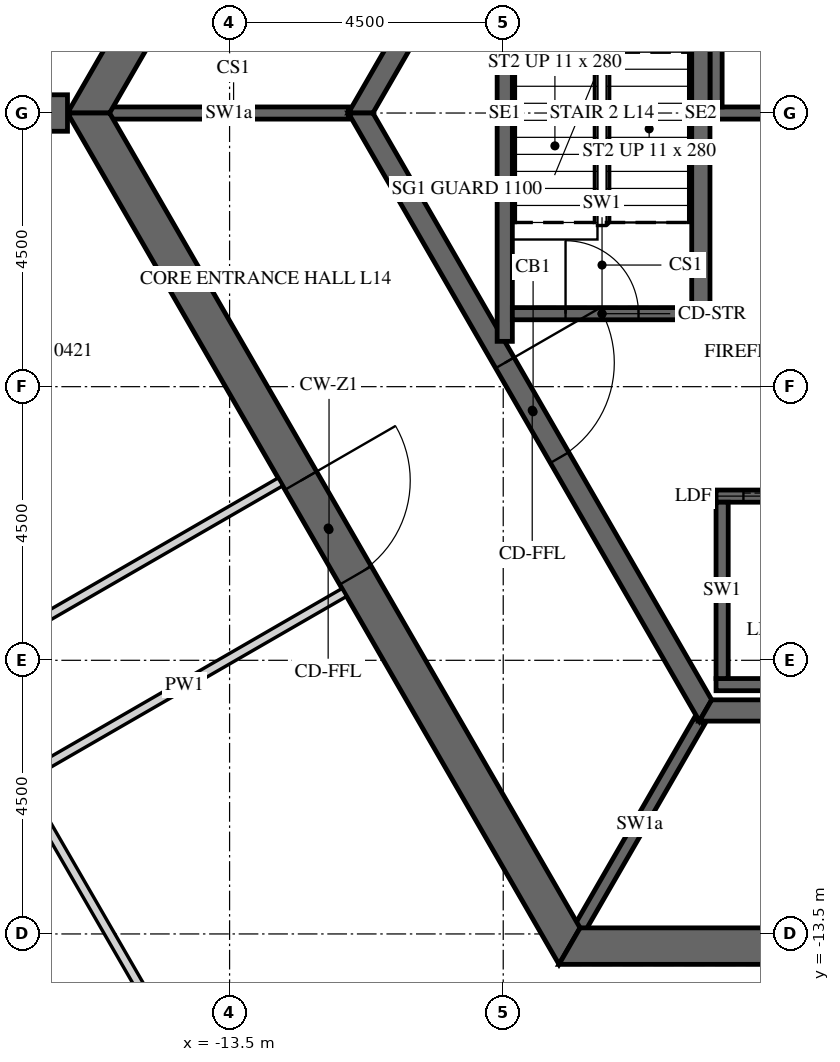
"""IFC4 building model, lengths in metres.
Left out: names, types, materials, properties, quantities, classifications, styles, units other than length and angle.
Written with IfcOpenShell. Run it as: python <this file> out.ifc"""

import sys

from ifc_helpers import new_model, si_unit, direction, frame, frame_2d, origin, place, context, subcontext, project, spatial, polyline, rectangle, outline, extrude, element, fill, save


model = new_model("IFC4")
c1 = context("Model", 3, precision=1e-05, world=origin(), true_north=direction((0.0, 1.0)))
c2 = subcontext(c1, "Body", "Model", "MODEL_VIEW")
j1 = project(units=[si_unit("LENGTHUNIT", "METRE"), si_unit("PLANEANGLEUNIT", "RADIAN")], contexts=[c1])
p1 = place(None, origin())
s1 = spatial("IfcSite", under=j1, at=p1, CompositionType="ELEMENT")
p2 = place(p1, origin())
s2 = spatial("IfcBuilding", under=s1, at=p2, CompositionType="ELEMENT")
p3 = place(p2, frame((0.0, 0.0, 68.7)))
s3 = spatial("IfcBuildingStorey", under=s2, at=p3, CompositionType="ELEMENT", Elevation=68.7)
p4 = place(p3, frame((-7.91, 13.7, -0.15), z_axis=(0.0, 0.0, 1.0), x_axis=(-0.499999880136, -0.866025472988, 0.0)))
e1 = element("IfcWall", 1, at=p4, inside=s3, PredefinedType="SHEAR", context=c2, shape_type="SweptSolid", body=[
    extrude(outline(polyline([(-0.173, -0.3), (15.993, -0.3), (15.646, 0.3), (0.173, 0.3), (-0.173, -0.3)])), origin(), (0.0, 0.0, 1.0), 3.9),
])
p5 = place(p4, frame((7.039, 0.0, 0.15)))
e2 = element("IfcOpeningElement", 2, at=p5, cuts=e1, PredefinedType="OPENING", context=c2, shape_type="SweptSolid", body=[
    extrude(rectangle(XDim=1.8, YDim=2.4, at=frame_2d((0.9, 1.2))), frame((0.0, 0.31, 0.0), z_axis=(0.0, -1.0, 0.0), x_axis=(1.0, 0.0, 0.0)), (0.0, 0.0, 1.0), 0.62),
])
p6 = place(p3, frame((-15.819, 0.0, -0.15), z_axis=(0.0, 0.0, 1.0), x_axis=(0.499999880136, -0.866025472988, 0.0)))
e3 = element("IfcWall", 3, at=p6, inside=s3, PredefinedType="SHEAR", context=c2, shape_type="SweptSolid", body=[
    extrude(outline(polyline([(-0.173, -0.3), (15.993, -0.3), (15.646, 0.3), (0.173, 0.3), (-0.173, -0.3)])), origin(), (0.0, 0.0, 1.0), 3.9),
])
p7 = place(p6, frame((6.981, 0.0, 0.15)))
e4 = element("IfcOpeningElement", 4, at=p7, cuts=e3, PredefinedType="OPENING", context=c2, shape_type="SweptSolid", body=[
    extrude(rectangle(XDim=1.8, YDim=2.4, at=frame_2d((0.9, 1.2))), frame((0.0, 0.31, 0.0), z_axis=(0.0, -1.0, 0.0), x_axis=(1.0, 0.0, 0.0)), (0.0, 0.0, 1.0), 0.62),
])
p8 = place(p3, frame((-7.91, -13.7, -0.15), z_axis=(0.0, 0.0, 1.0), x_axis=(1.0, 0.0, 0.0)))
e5 = element("IfcWall", 5, at=p8, inside=s3, PredefinedType="SHEAR", context=c2, shape_type="SweptSolid", body=[
    extrude(outline(polyline([(-0.173, -0.3), (15.993, -0.3), (15.646, 0.3), (0.173, 0.3), (-0.173, -0.3)])), origin(), (0.0, 0.0, 1.0), 3.9),
])
p9 = place(p8, frame((7.31, 0.0, 0.15)))
e6 = element("IfcOpeningElement", 6, at=p9, cuts=e5, PredefinedType="OPENING", context=c2, shape_type="SweptSolid", body=[
    extrude(rectangle(XDim=1.2, YDim=2.4, at=frame_2d((0.6, 1.2))), frame((0.0, 0.31, 0.0), z_axis=(0.0, -1.0, 0.0), x_axis=(1.0, 0.0, 0.0)), (0.0, 0.0, 1.0), 0.62),
])
p10 = place(p3, frame((-16.166, 0.0, -0.15), z_axis=(0.0, 0.0, 1.0), x_axis=(-1.0, 0.0, 0.0)))
e7 = element("IfcWall", 7, at=p10, inside=s3, PredefinedType="SHEAR", context=c2, shape_type="SweptSolid", body=[
    extrude(rectangle(XDim=16.509, YDim=0.6, at=frame_2d((8.254, 0.0))), origin(), (0.0, 0.0, 1.0), 3.9),
])
p11 = place(p10, frame((7.354, 0.0, 0.15)))
e8 = element("IfcOpeningElement", 8, at=p11, cuts=e7, PredefinedType="OPENING", context=c2, shape_type="SweptSolid", body=[
    extrude(rectangle(XDim=1.8, YDim=2.4, at=frame_2d((0.9, 1.2))), frame((0.0, 0.31, 0.0), z_axis=(0.0, -1.0, 0.0), x_axis=(1.0, 0.0, 0.0)), (0.0, 0.0, 1.0), 0.62),
])
p12 = place(p3, frame((-5.673, 9.825, -0.15), z_axis=(0.0, 0.0, 1.0), x_axis=(-0.499995046907, -0.866028263435, 0.0)))
e9 = element("IfcWall", 9, at=p12, inside=s3, PredefinedType="SHEAR", context=c2, shape_type="SweptSolid", body=[
    extrude(outline(polyline([(-0.101, -0.175), (11.446, -0.175), (11.244, 0.175), (0.101, 0.175), (-0.101, -0.175)])), origin(), (0.0, 0.0, 1.0), 3.9),
])
p13 = place(p12, frame((4.801, 0.0, 0.15)))
e10 = element("IfcOpeningElement", 10, at=p13, cuts=e9, PredefinedType="OPENING", context=c2, shape_type="SweptSolid", body=[
    extrude(rectangle(XDim=1.8, YDim=2.4, at=frame_2d((0.9, 1.2))), frame((0.0, 0.185, 0.0), z_axis=(0.0, -1.0, 0.0), x_axis=(1.0, 0.0, 0.0)), (0.0, 0.0, 1.0), 0.37),
])
p14 = place(p3, frame((-11.345, 0.0, -0.15), z_axis=(0.0, 0.0, 1.0), x_axis=(0.499995046907, -0.866028263435, 0.0)))
e11 = element("IfcWall", 11, at=p14, inside=s3, PredefinedType="SHEAR", context=c2, shape_type="SweptSolid", body=[
    extrude(outline(polyline([(-0.101, -0.175), (11.446, -0.175), (11.244, 0.175), (0.101, 0.175), (-0.101, -0.175)])), origin(), (0.0, 0.0, 1.0), 3.9),
])
p15 = place(p14, frame((4.744, 0.0, 0.15)))
e12 = element("IfcOpeningElement", 12, at=p15, cuts=e11, PredefinedType="OPENING", context=c2, shape_type="SweptSolid", body=[
    extrude(rectangle(XDim=1.8, YDim=2.4, at=frame_2d((0.9, 1.2))), frame((0.0, 0.185, 0.0), z_axis=(0.0, -1.0, 0.0), x_axis=(1.0, 0.0, 0.0)), (0.0, 0.0, 1.0), 0.37),
])
p16 = place(p3, frame((-5.673, -9.825, -0.15), z_axis=(0.0, 0.0, 1.0), x_axis=(1.0, 0.0, 0.0)))
e13 = element("IfcWall", 13, at=p16, inside=s3, PredefinedType="SHEAR", context=c2, shape_type="SweptSolid", body=[
    extrude(outline(polyline([(-0.101, -0.175), (11.446, -0.175), (11.244, 0.175), (0.101, 0.175), (-0.101, -0.175)])), origin(), (0.0, 0.0, 1.0), 3.9),
])
p17 = place(p3, frame((-5.6, 0.0, -0.25), z_axis=(0.0, 0.0, 1.0), x_axis=(1.0, 0.0, 0.0)))
e14 = element("IfcWall", 14, at=p17, inside=s3, PredefinedType="SHEAR", context=c2, shape_type="SweptSolid", body=[
    extrude(rectangle(XDim=11.2, YDim=0.2, at=frame_2d((5.6, 0.0))), origin(), (0.0, 0.0, 1.0), 3.9),
])
p18 = place(p3, frame((-5.5, 0.1, -0.25), z_axis=(0.0, 0.0, 1.0), x_axis=(0.0, 1.0, 0.0)))
e15 = element("IfcWall", 15, at=p18, inside=s3, PredefinedType="SHEAR", context=c2, shape_type="SweptSolid", body=[
    extrude(rectangle(XDim=3.1, YDim=0.2, at=frame_2d((1.55, 0.0))), origin(), (0.0, 0.0, 1.0), 3.9),
])
p19 = place(p3, frame((-5.5, -6.3, -0.25), z_axis=(0.0, 0.0, 1.0), x_axis=(1.0, 0.0, 0.0)))
e16 = element("IfcWall", 16, at=p19, inside=s3, PredefinedType="SHEAR", context=c2, shape_type="SweptSolid", body=[
    extrude(rectangle(XDim=9.2, YDim=0.2, at=frame_2d((4.6, 0.0))), origin(), (0.0, 0.0, 1.0), 3.9),
])
p20 = place(p19, frame((0.45, 0.0, 0.25)))
e17 = element("IfcOpeningElement", 17, at=p20, cuts=e16, PredefinedType="OPENING", context=c2, shape_type="SweptSolid", body=[
    extrude(rectangle(XDim=1.1, YDim=2.1, at=frame_2d((0.55, 1.05))), frame((0.0, 0.11, 0.0), z_axis=(0.0, -1.0, 0.0), x_axis=(1.0, 0.0, 0.0)), (0.0, 0.0, 1.0), 0.22),
])
p21 = place(p19, frame((2.25, 0.0, 0.25)))
e18 = element("IfcOpeningElement", 18, at=p21, cuts=e16, PredefinedType="OPENING", context=c2, shape_type="SweptSolid", body=[
    extrude(rectangle(XDim=1.1, YDim=2.1, at=frame_2d((0.55, 1.05))), frame((0.0, 0.11, 0.0), z_axis=(0.0, -1.0, 0.0), x_axis=(1.0, 0.0, 0.0)), (0.0, 0.0, 1.0), 0.22),
])
p22 = place(p19, frame((4.05, 0.0, 0.25)))
e19 = element("IfcOpeningElement", 19, at=p22, cuts=e16, PredefinedType="OPENING", context=c2, shape_type="SweptSolid", body=[
    extrude(rectangle(XDim=1.1, YDim=2.1, at=frame_2d((0.55, 1.05))), frame((0.0, 0.11, 0.0), z_axis=(0.0, -1.0, 0.0), x_axis=(1.0, 0.0, 0.0)), (0.0, 0.0, 1.0), 0.22),
])
p23 = place(p19, frame((5.85, 0.0, 0.25)))
e20 = element("IfcOpeningElement", 20, at=p23, cuts=e16, PredefinedType="OPENING", context=c2, shape_type="SweptSolid", body=[
    extrude(rectangle(XDim=1.1, YDim=2.1, at=frame_2d((0.55, 1.05))), frame((0.0, 0.11, 0.0), z_axis=(0.0, -1.0, 0.0), x_axis=(1.0, 0.0, 0.0)), (0.0, 0.0, 1.0), 0.22),
])
p24 = place(p19, frame((7.65, 0.0, 0.25)))
e21 = element("IfcOpeningElement", 21, at=p24, cuts=e16, PredefinedType="OPENING", context=c2, shape_type="SweptSolid", body=[
    extrude(rectangle(XDim=1.1, YDim=2.1, at=frame_2d((0.55, 1.05))), frame((0.0, 0.11, 0.0), z_axis=(0.0, -1.0, 0.0), x_axis=(1.0, 0.0, 0.0)), (0.0, 0.0, 1.0), 0.22),
])
p25 = place(p3, frame((-5.5, -9.4, -0.25), z_axis=(0.0, 0.0, 1.0), x_axis=(1.0, 0.0, 0.0)))
e22 = element("IfcWall", 22, at=p25, inside=s3, PredefinedType="SHEAR", context=c2, shape_type="SweptSolid", body=[
    extrude(rectangle(XDim=9.2, YDim=0.2, at=frame_2d((4.6, 0.0))), origin(), (0.0, 0.0, 1.0), 3.9),
])
p26 = place(p3, frame((-5.4, -9.3, -0.25), z_axis=(0.0, 0.0, 1.0), x_axis=(0.0, 1.0, 0.0)))
e23 = element("IfcWall", 23, at=p26, inside=s3, PredefinedType="SHEAR", context=c2, shape_type="SweptSolid", body=[
    extrude(rectangle(XDim=2.9, YDim=0.2, at=frame_2d((1.45, 0.0))), origin(), (0.0, 0.0, 1.0), 3.9),
])
p27 = place(p3, frame((-11.547, 0.0, -0.15), z_axis=(0.0, 0.0, 1.0), x_axis=(-1.0, 0.0, 0.0)))
e24 = element("IfcWall", 24, at=p27, inside=s3, PredefinedType="SHEAR", context=c2, shape_type="SweptSolid", body=[
    extrude(rectangle(XDim=3.926, YDim=0.2, at=frame_2d((1.963, 0.0))), origin(), (0.0, 0.0, 1.0), 3.9),
])
p28 = place(p3, frame((-5.773, -10.0, -0.15), z_axis=(0.0, 0.0, 1.0), x_axis=(-0.500038251005, -0.86600331843, 0.0)))
e25 = element("IfcWall", 25, at=p28, inside=s3, PredefinedType="SHEAR", context=c2, shape_type="SweptSolid", body=[
    extrude(rectangle(XDim=3.926, YDim=0.2, at=frame_2d((1.963, 0.0))), origin(), (0.0, 0.0, 1.0), 3.9),
])
p29 = place(p3, frame((-5.75, -3.4, -0.25), z_axis=(0.0, 0.0, 1.0), x_axis=(0.0, 1.0, 0.0)))
e26 = element("IfcWall", 26, at=p29, inside=s3, PredefinedType="SHEAR", context=c2, shape_type="SweptSolid", body=[
    extrude(rectangle(XDim=6.8, YDim=0.3, at=frame_2d((3.4, 0.0))), origin(), (0.0, 0.0, 1.0), 3.9),
])
p30 = place(p3, frame((-8.975, -3.755, -0.25), z_axis=(0.0, 0.0, 1.0), x_axis=(0.0, 1.0, 0.0)))
e27 = element("IfcWall", 27, at=p30, inside=s3, PredefinedType="SHEAR", context=c2, shape_type="SweptSolid", body=[
    extrude(rectangle(XDim=7.51, YDim=0.25, at=frame_2d((3.755, 0.0))), origin(), (0.0, 0.0, 1.0), 3.9),
])
p31 = place(p3, frame((-8.85, -3.3, -0.25), z_axis=(0.0, 0.0, 1.0), x_axis=(1.0, 0.0, 0.0)))
e28 = element("IfcWall", 28, at=p31, inside=s3, PredefinedType="SHEAR", context=c2, shape_type="SweptSolid", body=[
    extrude(rectangle(XDim=2.95, YDim=0.2, at=frame_2d((1.475, 0.0))), origin(), (0.0, 0.0, 1.0), 3.9),
])
p32 = place(p31, frame((0.875, 0.0, 0.25)))
e29 = element("IfcOpeningElement", 29, at=p32, cuts=e28, PredefinedType="OPENING", context=c2, shape_type="SweptSolid", body=[
    extrude(rectangle(XDim=1.2, YDim=2.4, at=frame_2d((0.6, 1.2))), frame((0.0, 0.11, 0.0), z_axis=(0.0, -1.0, 0.0), x_axis=(1.0, 0.0, 0.0)), (0.0, 0.0, 1.0), 0.22),
])
p33 = place(p3, frame((-24.09, -2.175, 0.0), z_axis=(0.0, 0.0, 1.0), x_axis=(0.499996832073, -0.86602723278, 0.0)))
e30 = element("IfcWall", 30, at=p33, inside=s3, PredefinedType="PARTITIONING", context=c2, shape_type="SweptSolid", body=[
    extrude(rectangle(XDim=23.877, YDim=0.15, at=frame_2d((11.938, 0.0))), origin(), (0.0, 0.0, 1.0), 2.988),
])
p34 = place(p33, frame((3.943, 0.0, 0.0)))
e31 = element("IfcOpeningElement", 31, at=p34, cuts=e30, PredefinedType="OPENING", context=c2, shape_type="SweptSolid", body=[
    extrude(rectangle(XDim=1.0, YDim=2.1, at=frame_2d((0.5, 1.05))), frame((0.0, 0.085, 0.0), z_axis=(0.0, -1.0, 0.0), x_axis=(1.0, 0.0, 0.0)), (0.0, 0.0, 1.0), 0.17),
])
p35 = place(p33, frame((15.672, 0.0, 0.0)))
e32 = element("IfcOpeningElement", 32, at=p35, cuts=e30, PredefinedType="OPENING", context=c2, shape_type="SweptSolid", body=[
    extrude(rectangle(XDim=1.0, YDim=2.1, at=frame_2d((0.5, 1.05))), frame((0.0, 0.085, 0.0), z_axis=(0.0, -1.0, 0.0), x_axis=(1.0, 0.0, 0.0)), (0.0, 0.0, 1.0), 0.17),
])
p36 = place(p33, frame((19.525, 0.0, 0.0)))
e33 = element("IfcOpeningElement", 33, at=p36, cuts=e30, PredefinedType="OPENING", context=c2, shape_type="SweptSolid", body=[
    extrude(rectangle(XDim=1.0, YDim=2.1, at=frame_2d((0.5, 1.05))), frame((0.0, 0.085, 0.0), z_axis=(0.0, -1.0, 0.0), x_axis=(1.0, 0.0, 0.0)), (0.0, 0.0, 1.0), 0.17),
])
p37 = place(p3, frame((-12.664, -6.066, 0.0), z_axis=(0.0, 0.0, 1.0), x_axis=(-0.866023618125, -0.500003092839, 0.0)))
e34 = element("IfcWall", 34, at=p37, inside=s3, PredefinedType="PARTITIONING", context=c2, shape_type="SweptSolid", body=[
    extrude(rectangle(XDim=6.15, YDim=0.15, at=frame_2d((3.075, 0.0))), origin(), (0.0, 0.0, 1.0), 2.988),
])
p38 = place(p3, frame((-11.197, -20.907, 0.0), z_axis=(0.0, 0.0, 1.0), x_axis=(-0.500004557924, 0.86602277225, 0.0)))
e35 = element("IfcWall", 35, at=p38, inside=s3, PredefinedType="PARTITIONING", context=c2, shape_type="SweptSolid", body=[
    extrude(rectangle(XDim=11.487, YDim=0.15, at=frame_2d((5.743, 0.0))), origin(), (0.0, 0.0, 1.0), 2.988),
])
p39 = place(p38, frame((5.293, 0.0, 0.0)))
e36 = element("IfcOpeningElement", 36, at=p39, cuts=e35, PredefinedType="OPENING", context=c2, shape_type="SweptSolid", body=[
    extrude(rectangle(XDim=0.9, YDim=2.1, at=frame_2d((0.45, 1.05))), frame((0.0, 0.085, 0.0), z_axis=(0.0, -1.0, 0.0), x_axis=(1.0, 0.0, 0.0)), (0.0, 0.0, 1.0), 0.17),
])
p40 = place(p3, frame((-16.875, -10.922, 0.0), z_axis=(0.0, 0.0, 1.0), x_axis=(0.866023634079, 0.500003065207, 0.0)))
e37 = element("IfcWall", 37, at=p40, inside=s3, PredefinedType="PARTITIONING", context=c2, shape_type="SweptSolid", body=[
    extrude(rectangle(XDim=6.075, YDim=0.15, at=frame_2d((3.038, 0.0))), origin(), (0.0, 0.0, 1.0), 2.988),
])
p41 = place(p7, origin())
e38 = element("IfcDoor", 38, at=p41, inside=s3, OperationType="DOUBLE_DOOR_SINGLE_SWING", PredefinedType="DOOR", context=c2, shape_type="SweptSolid", body=[
    extrude(rectangle(XDim=1.8, YDim=2.4, at=frame_2d((0.9, 1.2))), frame((0.0, 0.025, 0.0), z_axis=(0.0, -1.0, 0.0), x_axis=(1.0, 0.0, 0.0)), (0.0, 0.0, 1.0), 0.05),
])
fill(e4, e38)
p42 = place(p15, origin())
e39 = element("IfcDoor", 39, at=p42, inside=s3, OperationType="DOUBLE_DOOR_SINGLE_SWING", PredefinedType="DOOR", context=c2, shape_type="SweptSolid", body=[
    extrude(rectangle(XDim=1.8, YDim=2.4, at=frame_2d((0.9, 1.2))), frame((0.0, 0.025, 0.0), z_axis=(0.0, -1.0, 0.0), x_axis=(1.0, 0.0, 0.0)), (0.0, 0.0, 1.0), 0.05),
])
fill(e12, e39)
p43 = place(p32, origin())
e40 = element("IfcDoor", 40, at=p43, inside=s3, OperationType="SINGLE_SWING_LEFT", PredefinedType="DOOR", context=c2, shape_type="SweptSolid", body=[
    extrude(rectangle(XDim=1.2, YDim=2.4, at=frame_2d((0.6, 1.2))), frame((0.0, 0.025, 0.0), z_axis=(0.0, -1.0, 0.0), x_axis=(1.0, 0.0, 0.0)), (0.0, 0.0, 1.0), 0.05),
])
fill(e29, e40)
p44 = place(p20, origin())
e41 = element("IfcDoor", 41, at=p44, inside=s3, OperationType="SLIDING_TO_LEFT", PredefinedType="DOOR", context=c2, shape_type="SweptSolid", body=[
    extrude(rectangle(XDim=1.1, YDim=2.1, at=frame_2d((0.55, 1.05))), frame((0.0, 0.025, 0.0), z_axis=(0.0, -1.0, 0.0), x_axis=(1.0, 0.0, 0.0)), (0.0, 0.0, 1.0), 0.05),
])
fill(e17, e41)
save(model, sys.argv[1])
